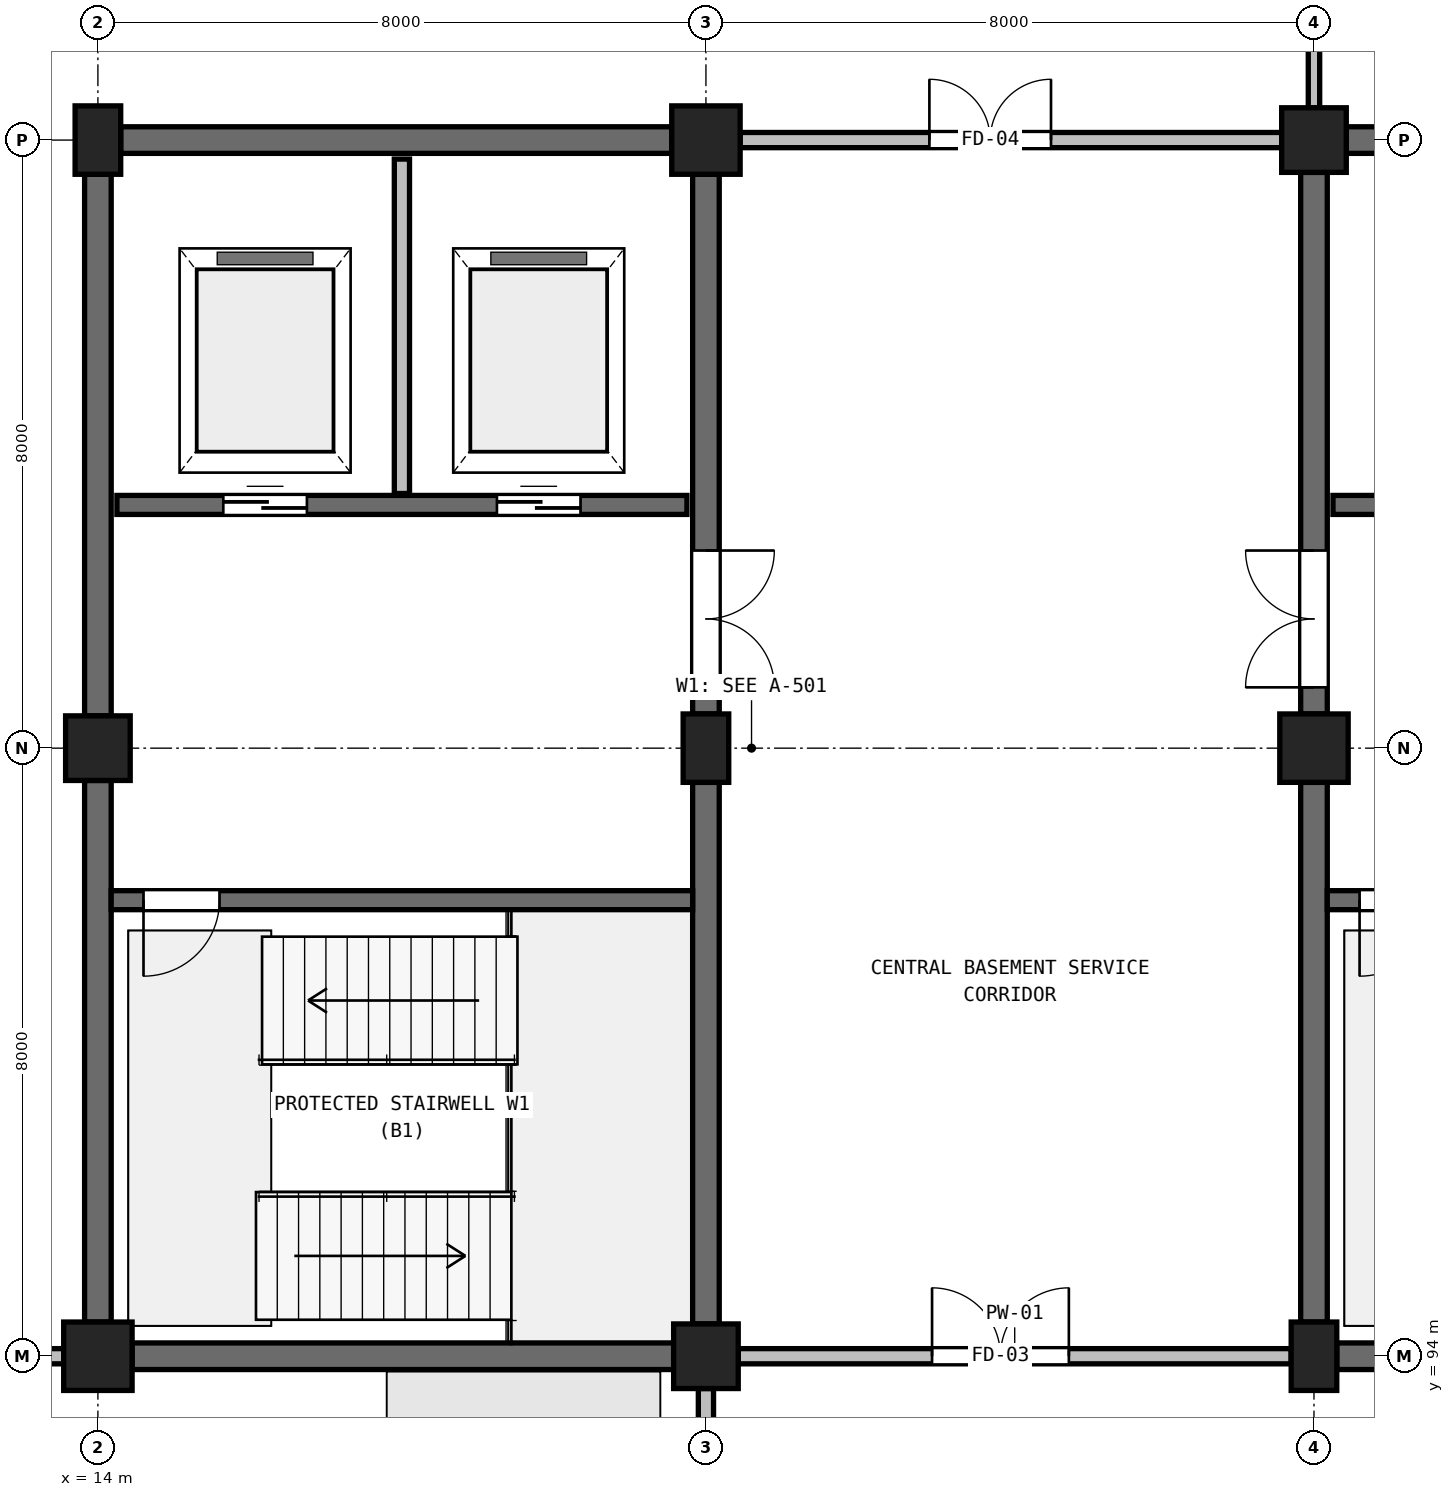
"""IFC4 building model, lengths in metres.
Left out: names, types, materials, properties, quantities, classifications, styles, units other than length and angle.
Written with IfcOpenShell. Run it as: python <this file> out.ifc"""

import sys

from ifc_helpers import new_model, si_unit, direction, frame, frame_2d, origin, origin_2d, place, context, subcontext, project, spatial, rectangle, extrude, element, fill, save


model = new_model("IFC4")
c1 = context("Model", 3, precision=1e-05, world=origin(), true_north=direction((0.0, 1.0)))
c2 = subcontext(c1, "Body", "Model", "MODEL_VIEW")
j1 = project(units=[si_unit("LENGTHUNIT", "METRE"), si_unit("PLANEANGLEUNIT", "RADIAN")], contexts=[c1])
p1 = place(None, origin())
s1 = spatial("IfcSite", under=j1, at=p1, CompositionType="ELEMENT")
p2 = place(p1, origin())
s2 = spatial("IfcBuilding", under=s1, at=p2, CompositionType="ELEMENT")
p3 = place(p2, frame((0.0, 0.0, -4.2)))
s3 = spatial("IfcBuildingStorey", under=s2, at=p3, CompositionType="ELEMENT", Elevation=-4.2)
p4 = place(p3, frame((14.0, 94.0, 0.0), z_axis=(0.0, 0.0, 1.0), x_axis=(1.0, 0.0, 0.0)))
e1 = element("IfcColumn", 1, at=p4, inside=s3, PredefinedType="COLUMN", context=c2, shape_type="SweptSolid", body=[
    extrude(rectangle(XDim=0.9, YDim=0.9, at=origin_2d()), origin(), (0.0, 0.0, 1.0), 4.2),
])
p5 = place(p3, frame((14.0, 102.0, 0.0), z_axis=(0.0, 0.0, 1.0), x_axis=(1.0, 0.0, 0.0)))
e2 = element("IfcColumn", 2, at=p5, inside=s3, PredefinedType="COLUMN", context=c2, shape_type="SweptSolid", body=[
    extrude(rectangle(XDim=0.85, YDim=0.85, at=origin_2d()), origin(), (0.0, 0.0, 1.0), 4.2),
])
p6 = place(p3, frame((14.0, 110.0, 0.0), z_axis=(0.0, 0.0, 1.0), x_axis=(1.0, 0.0, 0.0)))
e3 = element("IfcColumn", 3, at=p6, inside=s3, PredefinedType="COLUMN", context=c2, shape_type="SweptSolid", body=[
    extrude(rectangle(XDim=0.6, YDim=0.9, at=origin_2d()), origin(), (0.0, 0.0, 1.0), 4.2),
])
p7 = place(p3, frame((22.0, 94.0, 0.0), z_axis=(0.0, 0.0, 1.0), x_axis=(1.0, 0.0, 0.0)))
e4 = element("IfcColumn", 4, at=p7, inside=s3, PredefinedType="COLUMN", context=c2, shape_type="SweptSolid", body=[
    extrude(rectangle(XDim=0.85, YDim=0.85, at=origin_2d()), origin(), (0.0, 0.0, 1.0), 4.2),
])
p8 = place(p3, frame((22.0, 102.0, 0.0), z_axis=(0.0, 0.0, 1.0), x_axis=(1.0, 0.0, 0.0)))
e5 = element("IfcColumn", 5, at=p8, inside=s3, PredefinedType="COLUMN", context=c2, shape_type="SweptSolid", body=[
    extrude(rectangle(XDim=0.6, YDim=0.9, at=origin_2d()), origin(), (0.0, 0.0, 1.0), 4.2),
])
p9 = place(p3, frame((22.0, 110.0, 0.0), z_axis=(0.0, 0.0, 1.0), x_axis=(1.0, 0.0, 0.0)))
e6 = element("IfcColumn", 6, at=p9, inside=s3, PredefinedType="COLUMN", context=c2, shape_type="SweptSolid", body=[
    extrude(rectangle(XDim=0.9, YDim=0.9, at=origin_2d()), origin(), (0.0, 0.0, 1.0), 4.2),
])
p10 = place(p3, frame((30.0, 94.0, 0.0), z_axis=(0.0, 0.0, 1.0), x_axis=(1.0, 0.0, 0.0)))
e7 = element("IfcColumn", 7, at=p10, inside=s3, PredefinedType="COLUMN", context=c2, shape_type="SweptSolid", body=[
    extrude(rectangle(XDim=0.6, YDim=0.9, at=origin_2d()), origin(), (0.0, 0.0, 1.0), 4.2),
])
p11 = place(p3, frame((30.0, 102.0, 0.0), z_axis=(0.0, 0.0, 1.0), x_axis=(1.0, 0.0, 0.0)))
e8 = element("IfcColumn", 8, at=p11, inside=s3, PredefinedType="COLUMN", context=c2, shape_type="SweptSolid", body=[
    extrude(rectangle(XDim=0.9, YDim=0.9, at=origin_2d()), origin(), (0.0, 0.0, 1.0), 4.2),
])
p12 = place(p3, frame((30.0, 110.0, 0.0), z_axis=(0.0, 0.0, 1.0), x_axis=(1.0, 0.0, 0.0)))
e9 = element("IfcColumn", 9, at=p12, inside=s3, PredefinedType="COLUMN", context=c2, shape_type="SweptSolid", body=[
    extrude(rectangle(XDim=0.85, YDim=0.85, at=origin_2d()), origin(), (0.0, 0.0, 1.0), 4.2),
])
p13 = place(p3, frame((6.394, 110.394, 0.0), z_axis=(0.0, 0.0, 1.0), x_axis=(0.707106781187, 0.707106781187, 0.0)))
e10 = element("IfcWall", 10, at=p13, inside=s3, PredefinedType="USERDEFINED", context=c2, shape_type="SweptSolid", body=[
    extrude(rectangle(XDim=10.089, YDim=0.4, at=frame_2d((5.044, 0.0))), origin(), (0.0, 0.0, 1.0), 3.92),
])
p14 = place(p3, frame((14.45, 94.0, 0.0), z_axis=(0.0, 0.0, 1.0), x_axis=(1.0, 0.0, 0.0)))
e11 = element("IfcWall", 11, at=p14, inside=s3, PredefinedType="SHEAR", context=c2, shape_type="SweptSolid", body=[
    extrude(rectangle(XDim=7.125, YDim=0.35, at=frame_2d((3.562, 0.0))), origin(), (0.0, 0.0, 1.0), 3.98),
])
p15 = place(p3, frame((14.3, 110.0, 0.0), z_axis=(0.0, 0.0, 1.0), x_axis=(1.0, 0.0, 0.0)))
e12 = element("IfcWall", 12, at=p15, inside=s3, PredefinedType="SHEAR", context=c2, shape_type="SweptSolid", body=[
    extrude(rectangle(XDim=7.25, YDim=0.35, at=frame_2d((3.625, 0.0))), origin(), (0.0, 0.0, 1.0), 3.98),
])
for number, where, z_axis, x_axis in (
    (13, (14.0, 94.45, 0.0), (0.0, 0.0, 1.0), (0.0, 1.0, 0.0)),
    (14, (14.0, 102.425, 0.0), (0.0, 0.0, 1.0), (0.0, 1.0, 0.0)),
    (15, (22.0, 94.425, 0.0), (0.0, 0.0, 1.0), (0.0, 1.0, 0.0)),
):
    element("IfcWall", number, at=place(p3, frame(where, z_axis=z_axis, x_axis=x_axis)), inside=s3, PredefinedType="SHEAR", context=c2, shape_type="SweptSolid", body=[
        extrude(rectangle(XDim=7.125, YDim=0.35, at=frame_2d((3.562, 0.0))), origin(), (0.0, 0.0, 1.0), 3.98),
    ])
p16 = place(p3, frame((22.0, 102.45, 0.0), z_axis=(0.0, 0.0, 1.0), x_axis=(0.0, 1.0, 0.0)))
e16 = element("IfcWall", 16, at=p16, inside=s3, PredefinedType="SHEAR", context=c2, shape_type="SweptSolid", body=[
    extrude(rectangle(XDim=7.1, YDim=0.35, at=frame_2d((3.55, 0.0))), origin(), (0.0, 0.0, 1.0), 3.98),
])
p17 = place(p16, frame((0.35, 0.0, 0.0)))
e17 = element("IfcOpeningElement", 17, at=p17, cuts=e16, PredefinedType="OPENING", context=c2, shape_type="SweptSolid", body=[
    extrude(rectangle(XDim=1.8, YDim=2.2, at=frame_2d((0.9, 1.1))), frame((0.0, 0.185, 0.0), z_axis=(0.0, -1.0, 0.0), x_axis=(1.0, 0.0, 0.0)), (0.0, 0.0, 1.0), 0.37),
])
p18 = place(p3, frame((14.175, 100.0, 0.0), z_axis=(0.0, 0.0, 1.0), x_axis=(1.0, 0.0, 0.0)))
e18 = element("IfcWall", 18, at=p18, inside=s3, PredefinedType="SOLIDWALL", context=c2, shape_type="SweptSolid", body=[
    extrude(rectangle(XDim=7.65, YDim=0.25, at=frame_2d((3.825, 0.0))), origin(), (0.0, 0.0, 1.0), 3.98),
])
p19 = place(p18, frame((0.425, 0.0, 0.0)))
e19 = element("IfcOpeningElement", 19, at=p19, cuts=e18, PredefinedType="OPENING", context=c2, shape_type="SweptSolid", body=[
    extrude(rectangle(XDim=1.0, YDim=2.2, at=frame_2d((0.5, 1.1))), frame((0.0, 0.135, 0.0), z_axis=(0.0, -1.0, 0.0), x_axis=(1.0, 0.0, 0.0)), (0.0, 0.0, 1.0), 0.27),
])
p20 = place(p3, frame((14.25, 105.2, 0.0), z_axis=(0.0, 0.0, 1.0), x_axis=(1.0, 0.0, 0.0)))
e20 = element("IfcWall", 20, at=p20, inside=s3, PredefinedType="SOLIDWALL", context=c2, shape_type="SweptSolid", body=[
    extrude(rectangle(XDim=7.5, YDim=0.25, at=frame_2d((3.75, 0.0))), origin(), (0.0, 0.0, 1.0), 3.98),
])
p21 = place(p20, frame((1.4, 0.0, 0.0)))
e21 = element("IfcOpeningElement", 21, at=p21, cuts=e20, PredefinedType="OPENING", context=c2, shape_type="SweptSolid", body=[
    extrude(rectangle(XDim=1.1, YDim=2.2, at=frame_2d((0.55, 1.1))), frame((0.0, 0.135, 0.0), z_axis=(0.0, -1.0, 0.0), x_axis=(1.0, 0.0, 0.0)), (0.0, 0.0, 1.0), 0.27),
])
p22 = place(p20, frame((5.0, 0.0, 0.0)))
e22 = element("IfcOpeningElement", 22, at=p22, cuts=e20, PredefinedType="OPENING", context=c2, shape_type="SweptSolid", body=[
    extrude(rectangle(XDim=1.1, YDim=2.2, at=frame_2d((0.55, 1.1))), frame((0.0, 0.135, 0.0), z_axis=(0.0, -1.0, 0.0), x_axis=(1.0, 0.0, 0.0)), (0.0, 0.0, 1.0), 0.27),
])
p23 = place(p3, frame((18.0, 105.35, 0.0), z_axis=(0.0, 0.0, 1.0), x_axis=(0.0, 1.0, 0.0)))
e23 = element("IfcWall", 23, at=p23, inside=s3, PredefinedType="PARTITIONING", context=c2, shape_type="SweptSolid", body=[
    extrude(rectangle(XDim=4.4, YDim=0.2, at=frame_2d((2.2, 0.0))), origin(), (0.0, 0.0, 1.0), 3.9),
])
p24 = place(p3, frame((30.3, 94.0, 0.0), z_axis=(0.0, 0.0, 1.0), x_axis=(1.0, 0.0, 0.0)))
e24 = element("IfcWall", 24, at=p24, inside=s3, PredefinedType="SHEAR", context=c2, shape_type="SweptSolid", body=[
    extrude(rectangle(XDim=7.25, YDim=0.35, at=frame_2d((3.625, 0.0))), origin(), (0.0, 0.0, 1.0), 3.98),
])
p25 = place(p3, frame((30.425, 110.0, 0.0), z_axis=(0.0, 0.0, 1.0), x_axis=(1.0, 0.0, 0.0)))
e25 = element("IfcWall", 25, at=p25, inside=s3, PredefinedType="SHEAR", context=c2, shape_type="SweptSolid", body=[
    extrude(rectangle(XDim=7.275, YDim=0.35, at=frame_2d((3.637, 0.0))), origin(), (0.0, 0.0, 1.0), 3.98),
])
p26 = place(p3, frame((30.0, 94.45, 0.0), z_axis=(0.0, 0.0, 1.0), x_axis=(0.0, 1.0, 0.0)))
e26 = element("IfcWall", 26, at=p26, inside=s3, PredefinedType="SHEAR", context=c2, shape_type="SweptSolid", body=[
    extrude(rectangle(XDim=7.1, YDim=0.35, at=frame_2d((3.55, 0.0))), origin(), (0.0, 0.0, 1.0), 3.98),
])
p27 = place(p3, frame((30.0, 102.45, 0.0), z_axis=(0.0, 0.0, 1.0), x_axis=(0.0, 1.0, 0.0)))
e27 = element("IfcWall", 27, at=p27, inside=s3, PredefinedType="SHEAR", context=c2, shape_type="SweptSolid", body=[
    extrude(rectangle(XDim=7.125, YDim=0.35, at=frame_2d((3.562, 0.0))), origin(), (0.0, 0.0, 1.0), 3.98),
])
p28 = place(p27, frame((0.35, 0.0, 0.0)))
e28 = element("IfcOpeningElement", 28, at=p28, cuts=e27, PredefinedType="OPENING", context=c2, shape_type="SweptSolid", body=[
    extrude(rectangle(XDim=1.8, YDim=2.2, at=frame_2d((0.9, 1.1))), frame((0.0, 0.185, 0.0), z_axis=(0.0, -1.0, 0.0), x_axis=(1.0, 0.0, 0.0)), (0.0, 0.0, 1.0), 0.37),
])
p29 = place(p3, frame((30.175, 100.0, 0.0), z_axis=(0.0, 0.0, 1.0), x_axis=(1.0, 0.0, 0.0)))
e29 = element("IfcWall", 29, at=p29, inside=s3, PredefinedType="SOLIDWALL", context=c2, shape_type="SweptSolid", body=[
    extrude(rectangle(XDim=7.65, YDim=0.25, at=frame_2d((3.825, 0.0))), origin(), (0.0, 0.0, 1.0), 3.98),
])
p30 = place(p29, frame((0.425, 0.0, 0.0)))
e30 = element("IfcOpeningElement", 30, at=p30, cuts=e29, PredefinedType="OPENING", context=c2, shape_type="SweptSolid", body=[
    extrude(rectangle(XDim=1.0, YDim=2.2, at=frame_2d((0.5, 1.1))), frame((0.0, 0.135, 0.0), z_axis=(0.0, -1.0, 0.0), x_axis=(1.0, 0.0, 0.0)), (0.0, 0.0, 1.0), 0.27),
])
p31 = place(p3, frame((30.25, 105.2, 0.0), z_axis=(0.0, 0.0, 1.0), x_axis=(1.0, 0.0, 0.0)))
e31 = element("IfcWall", 31, at=p31, inside=s3, PredefinedType="SOLIDWALL", context=c2, shape_type="SweptSolid", body=[
    extrude(rectangle(XDim=4.3, YDim=0.25, at=frame_2d((2.15, 0.0))), origin(), (0.0, 0.0, 1.0), 3.98),
])
p32 = place(p31, frame((1.5, 0.0, 0.0)))
e32 = element("IfcOpeningElement", 32, at=p32, cuts=e31, PredefinedType="OPENING", context=c2, shape_type="SweptSolid", body=[
    extrude(rectangle(XDim=1.3, YDim=2.2, at=frame_2d((0.65, 1.1))), frame((0.0, 0.135, 0.0), z_axis=(0.0, -1.0, 0.0), x_axis=(1.0, 0.0, 0.0)), (0.0, 0.0, 1.0), 0.27),
])
p33 = place(p3, frame((6.45, 94.0, 0.0), z_axis=(0.0, 0.0, 1.0), x_axis=(1.0, 0.0, 0.0)))
e33 = element("IfcWall", 33, at=p33, inside=s3, PredefinedType="PARTITIONING", context=c2, shape_type="SweptSolid", body=[
    extrude(rectangle(XDim=7.1, YDim=0.2, at=frame_2d((3.55, 0.0))), origin(), (0.0, 0.0, 1.0), 3.07),
])
p34 = place(p33, frame((2.48, 0.0, 0.0)))
e34 = element("IfcOpeningElement", 34, at=p34, cuts=e33, PredefinedType="OPENING", context=c2, shape_type="SweptSolid", body=[
    extrude(rectangle(XDim=1.8, YDim=2.2, at=frame_2d((0.9, 1.1))), frame((0.0, 0.11, 0.0), z_axis=(0.0, -1.0, 0.0), x_axis=(1.0, 0.0, 0.0)), (0.0, 0.0, 1.0), 0.22),
])
p35 = place(p3, frame((22.425, 94.0, 0.0), z_axis=(0.0, 0.0, 1.0), x_axis=(1.0, 0.0, 0.0)))
e35 = element("IfcWall", 35, at=p35, inside=s3, PredefinedType="PARTITIONING", context=c2, shape_type="SweptSolid", body=[
    extrude(rectangle(XDim=7.275, YDim=0.2, at=frame_2d((3.637, 0.0))), origin(), (0.0, 0.0, 1.0), 3.02),
])
p36 = place(p35, frame((2.55, 0.0, 0.0)))
e36 = element("IfcOpeningElement", 36, at=p36, cuts=e35, PredefinedType="OPENING", context=c2, shape_type="SweptSolid", body=[
    extrude(rectangle(XDim=1.8, YDim=2.2, at=frame_2d((0.9, 1.1))), frame((0.0, 0.11, 0.0), z_axis=(0.0, -1.0, 0.0), x_axis=(1.0, 0.0, 0.0)), (0.0, 0.0, 1.0), 0.22),
])
p37 = place(p3, frame((22.0, 86.45, 0.0), z_axis=(0.0, 0.0, 1.0), x_axis=(0.0, 1.0, 0.0)))
e37 = element("IfcWall", 37, at=p37, inside=s3, PredefinedType="PARTITIONING", context=c2, shape_type="SweptSolid", body=[
    extrude(rectangle(XDim=7.125, YDim=0.2, at=frame_2d((3.562, 0.0))), origin(), (0.0, 0.0, 1.0), 3.02),
])
p38 = place(p3, frame((22.45, 110.0, 0.0), z_axis=(0.0, 0.0, 1.0), x_axis=(1.0, 0.0, 0.0)))
e38 = element("IfcWall", 38, at=p38, inside=s3, PredefinedType="PARTITIONING", context=c2, shape_type="SweptSolid", body=[
    extrude(rectangle(XDim=7.125, YDim=0.2, at=frame_2d((3.562, 0.0))), origin(), (0.0, 0.0, 1.0), 3.37),
])
p39 = place(p38, frame((2.49, 0.0, 0.0)))
e39 = element("IfcOpeningElement", 39, at=p39, cuts=e38, PredefinedType="OPENING", context=c2, shape_type="SweptSolid", body=[
    extrude(rectangle(XDim=1.6, YDim=2.2, at=frame_2d((0.8, 1.1))), frame((0.0, 0.11, 0.0), z_axis=(0.0, -1.0, 0.0), x_axis=(1.0, 0.0, 0.0)), (0.0, 0.0, 1.0), 0.22),
])
p40 = place(p3, frame((30.0, 110.425, 0.0), z_axis=(0.0, 0.0, 1.0), x_axis=(0.0, 1.0, 0.0)))
e40 = element("IfcWall", 40, at=p40, inside=s3, PredefinedType="PARTITIONING", context=c2, shape_type="SweptSolid", body=[
    extrude(rectangle(XDim=7.125, YDim=0.15, at=frame_2d((3.562, 0.0))), origin(), (0.0, 0.0, 1.0), 2.92),
])
p41 = place(p17, frame((1.8, 0.0, 0.0), z_axis=(0.0, 0.0, 1.0), x_axis=(-1.0, 0.0, 0.0)))
e41 = element("IfcDoor", 41, at=p41, inside=s3, OperationType="DOUBLE_DOOR_SINGLE_SWING", PredefinedType="DOOR", context=c2, shape_type="SweptSolid", body=[
    extrude(rectangle(XDim=1.8, YDim=2.2, at=frame_2d((0.9, 1.1))), frame((0.0, 0.025, 0.0), z_axis=(0.0, -1.0, 0.0), x_axis=(1.0, 0.0, 0.0)), (0.0, 0.0, 1.0), 0.05),
])
fill(e17, e41)
p42 = place(p19, frame((1.0, 0.0, 0.0), z_axis=(0.0, 0.0, 1.0), x_axis=(-1.0, 0.0, 0.0)))
e42 = element("IfcDoor", 42, at=p42, inside=s3, OperationType="SINGLE_SWING_LEFT", PredefinedType="DOOR", context=c2, shape_type="SweptSolid", body=[
    extrude(rectangle(XDim=1.0, YDim=2.2, at=frame_2d((0.5, 1.1))), frame((0.0, 0.025, 0.0), z_axis=(0.0, -1.0, 0.0), x_axis=(1.0, 0.0, 0.0)), (0.0, 0.0, 1.0), 0.05),
])
fill(e19, e42)
p43 = place(p21, origin())
e43 = element("IfcDoor", 43, at=p43, inside=s3, OperationType="DOUBLE_DOOR_SLIDING", PredefinedType="DOOR", context=c2, shape_type="SweptSolid", body=[
    extrude(rectangle(XDim=1.1, YDim=2.2, at=frame_2d((0.55, 1.1))), frame((0.0, 0.025, 0.0), z_axis=(0.0, -1.0, 0.0), x_axis=(1.0, 0.0, 0.0)), (0.0, 0.0, 1.0), 0.05),
])
fill(e21, e43)
p44 = place(p22, origin())
e44 = element("IfcDoor", 44, at=p44, inside=s3, OperationType="DOUBLE_DOOR_SLIDING", PredefinedType="DOOR", context=c2, shape_type="SweptSolid", body=[
    extrude(rectangle(XDim=1.1, YDim=2.2, at=frame_2d((0.55, 1.1))), frame((0.0, 0.025, 0.0), z_axis=(0.0, -1.0, 0.0), x_axis=(1.0, 0.0, 0.0)), (0.0, 0.0, 1.0), 0.05),
])
fill(e22, e44)
p45 = place(p28, origin())
e45 = element("IfcDoor", 45, at=p45, inside=s3, OperationType="DOUBLE_DOOR_SINGLE_SWING", PredefinedType="DOOR", context=c2, shape_type="SweptSolid", body=[
    extrude(rectangle(XDim=1.8, YDim=2.2, at=frame_2d((0.9, 1.1))), frame((0.0, 0.025, 0.0), z_axis=(0.0, -1.0, 0.0), x_axis=(1.0, 0.0, 0.0)), (0.0, 0.0, 1.0), 0.05),
])
fill(e28, e45)
p46 = place(p30, frame((1.0, 0.0, 0.0), z_axis=(0.0, 0.0, 1.0), x_axis=(-1.0, 0.0, 0.0)))
e46 = element("IfcDoor", 46, at=p46, inside=s3, OperationType="SINGLE_SWING_LEFT", PredefinedType="DOOR", context=c2, shape_type="SweptSolid", body=[
    extrude(rectangle(XDim=1.0, YDim=2.2, at=frame_2d((0.5, 1.1))), frame((0.0, 0.025, 0.0), z_axis=(0.0, -1.0, 0.0), x_axis=(1.0, 0.0, 0.0)), (0.0, 0.0, 1.0), 0.05),
])
fill(e30, e46)
p47 = place(p36, origin())
e47 = element("IfcDoor", 47, at=p47, inside=s3, OperationType="DOUBLE_DOOR_SINGLE_SWING", PredefinedType="DOOR", context=c2, shape_type="SweptSolid", body=[
    extrude(rectangle(XDim=1.8, YDim=2.2, at=frame_2d((0.9, 1.1))), frame((0.0, 0.025, 0.0), z_axis=(0.0, -1.0, 0.0), x_axis=(1.0, 0.0, 0.0)), (0.0, 0.0, 1.0), 0.05),
])
fill(e36, e47)
p48 = place(p39, origin())
e48 = element("IfcDoor", 48, at=p48, inside=s3, OperationType="DOUBLE_DOOR_SINGLE_SWING", PredefinedType="DOOR", context=c2, shape_type="SweptSolid", body=[
    extrude(rectangle(XDim=1.6, YDim=2.2, at=frame_2d((0.8, 1.1))), frame((0.0, 0.025, 0.0), z_axis=(0.0, -1.0, 0.0), x_axis=(1.0, 0.0, 0.0)), (0.0, 0.0, 1.0), 0.05),
])
fill(e39, e48)
save(model, sys.argv[1])
